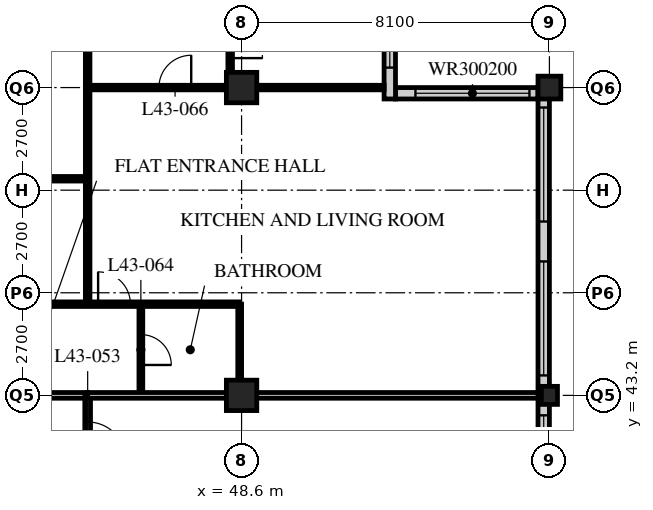
"""IFC4 building model, lengths in metres.
Left out: names, types, materials, properties, quantities, classifications, styles, units other than length and angle.
Written with IfcOpenShell. Run it as: python <this file> out.ifc"""

import sys

from ifc_helpers import new_model, si_unit, direction, frame, frame_2d, origin, origin_2d, place, context, subcontext, project, spatial, rectangle, hollow_rectangle, i_section, extrude, element, fill, save


model = new_model("IFC4")
c1 = context("Model", 3, precision=1e-05, world=origin(), true_north=direction((0.0, 1.0)))
c2 = subcontext(c1, "Body", "Model", "MODEL_VIEW")
j1 = project(units=[si_unit("LENGTHUNIT", "METRE"), si_unit("PLANEANGLEUNIT", "RADIAN")], contexts=[c1])
p1 = place(None, origin())
s1 = spatial("IfcSite", under=j1, at=p1, CompositionType="ELEMENT")
p2 = place(p1, origin())
s2 = spatial("IfcBuilding", under=s1, at=p2, CompositionType="ELEMENT")
p3 = place(p2, frame((0.0, 0.0, 170.4)))
s3 = spatial("IfcBuildingStorey", under=s2, at=p3, CompositionType="ELEMENT", Elevation=170.4)
for number, where, z_axis, x_axis in (
    (1, (48.6, 43.2, 0.0), (0.0, 0.0, 1.0), (1.0, 0.0, 0.0)),
    (2, (48.6, 51.3, 0.0), (0.0, 0.0, 1.0), (1.0, 0.0, 0.0)),
):
    element("IfcColumn", number, at=place(p3, frame(where, z_axis=z_axis, x_axis=x_axis)), inside=s3, PredefinedType="COLUMN", context=c2, shape_type="SweptSolid", body=[
        extrude(hollow_rectangle(XDim=0.8, YDim=0.8, WallThickness=0.08, at=origin_2d()), origin(), (0.0, 0.0, 1.0), 3.6),
    ])
p4 = place(p3, frame((56.7, 43.2, 0.0), z_axis=(0.0, 0.0, 1.0), x_axis=(1.0, 0.0, 0.0)))
e3 = element("IfcColumn", 3, at=p4, inside=s3, PredefinedType="COLUMN", context=c2, shape_type="SweptSolid", body=[
    extrude(i_section(OverallWidth=0.424, OverallDepth=0.475, WebThickness=0.048, FlangeThickness=0.077, FilletRadius=0.015, at=origin_2d()), origin(), (0.0, 0.0, 1.0), 3.6),
])
p5 = place(p3, frame((56.7, 51.3, 0.0), z_axis=(0.0, 0.0, 1.0), x_axis=(1.0, 0.0, 0.0)))
e4 = element("IfcColumn", 4, at=p5, inside=s3, PredefinedType="COLUMN", context=c2, shape_type="SweptSolid", body=[
    extrude(hollow_rectangle(XDim=0.6, YDim=0.6, WallThickness=0.05, at=origin_2d()), origin(), (0.0, 0.0, 1.0), 3.6),
])
p6 = place(p3, frame((56.55, 19.2, 0.0), z_axis=(0.0, 0.0, 1.0), x_axis=(0.0, 1.0, 0.0)))
e5 = element("IfcWall", 5, at=p6, inside=s3, PredefinedType="SOLIDWALL", context=c2, shape_type="SweptSolid", body=[
    extrude(rectangle(XDim=32.1, YDim=0.3, at=frame_2d((16.05, 0.0))), origin(), (0.0, 0.0, 1.0), 3.39),
])
p7 = place(p6, frame((0.225, 0.0, 0.6)))
e6 = element("IfcOpeningElement", 6, at=p7, cuts=e5, PredefinedType="OPENING", context=c2, shape_type="SweptSolid", body=[
    extrude(rectangle(XDim=3.0, YDim=2.4, at=frame_2d((1.5, 1.2))), frame((0.0, 0.16, 0.0), z_axis=(0.0, -1.0, 0.0), x_axis=(1.0, 0.0, 0.0)), (0.0, 0.0, 1.0), 0.32),
])
p8 = place(p6, frame((4.275, 0.0, 0.6)))
e7 = element("IfcOpeningElement", 7, at=p8, cuts=e5, PredefinedType="OPENING", context=c2, shape_type="SweptSolid", body=[
    extrude(rectangle(XDim=3.0, YDim=2.4, at=frame_2d((1.5, 1.2))), frame((0.0, 0.16, 0.0), z_axis=(0.0, -1.0, 0.0), x_axis=(1.0, 0.0, 0.0)), (0.0, 0.0, 1.0), 0.32),
])
p9 = place(p6, frame((8.325, 0.0, 0.6)))
e8 = element("IfcOpeningElement", 8, at=p9, cuts=e5, PredefinedType="OPENING", context=c2, shape_type="SweptSolid", body=[
    extrude(rectangle(XDim=3.0, YDim=2.4, at=frame_2d((1.5, 1.2))), frame((0.0, 0.16, 0.0), z_axis=(0.0, -1.0, 0.0), x_axis=(1.0, 0.0, 0.0)), (0.0, 0.0, 1.0), 0.32),
])
p10 = place(p6, frame((12.375, 0.0, 0.6)))
e9 = element("IfcOpeningElement", 9, at=p10, cuts=e5, PredefinedType="OPENING", context=c2, shape_type="SweptSolid", body=[
    extrude(rectangle(XDim=3.0, YDim=2.4, at=frame_2d((1.5, 1.2))), frame((0.0, 0.16, 0.0), z_axis=(0.0, -1.0, 0.0), x_axis=(1.0, 0.0, 0.0)), (0.0, 0.0, 1.0), 0.32),
])
p11 = place(p6, frame((16.425, 0.0, 0.6)))
e10 = element("IfcOpeningElement", 10, at=p11, cuts=e5, PredefinedType="OPENING", context=c2, shape_type="SweptSolid", body=[
    extrude(rectangle(XDim=3.0, YDim=2.4, at=frame_2d((1.5, 1.2))), frame((0.0, 0.16, 0.0), z_axis=(0.0, -1.0, 0.0), x_axis=(1.0, 0.0, 0.0)), (0.0, 0.0, 1.0), 0.32),
])
p12 = place(p6, frame((20.475, 0.0, 0.6)))
e11 = element("IfcOpeningElement", 11, at=p12, cuts=e5, PredefinedType="OPENING", context=c2, shape_type="SweptSolid", body=[
    extrude(rectangle(XDim=3.0, YDim=2.4, at=frame_2d((1.5, 1.2))), frame((0.0, 0.16, 0.0), z_axis=(0.0, -1.0, 0.0), x_axis=(1.0, 0.0, 0.0)), (0.0, 0.0, 1.0), 0.32),
])
p13 = place(p6, frame((24.525, 0.0, 0.6)))
e12 = element("IfcOpeningElement", 12, at=p13, cuts=e5, PredefinedType="OPENING", context=c2, shape_type="SweptSolid", body=[
    extrude(rectangle(XDim=3.0, YDim=2.4, at=frame_2d((1.5, 1.2))), frame((0.0, 0.16, 0.0), z_axis=(0.0, -1.0, 0.0), x_axis=(1.0, 0.0, 0.0)), (0.0, 0.0, 1.0), 0.32),
])
p14 = place(p6, frame((28.575, 0.0, 0.6)))
e13 = element("IfcOpeningElement", 13, at=p14, cuts=e5, PredefinedType="OPENING", context=c2, shape_type="SweptSolid", body=[
    extrude(rectangle(XDim=3.0, YDim=2.4, at=frame_2d((1.5, 1.2))), frame((0.0, 0.16, 0.0), z_axis=(0.0, -1.0, 0.0), x_axis=(1.0, 0.0, 0.0)), (0.0, 0.0, 1.0), 0.32),
])
p15 = place(p3, frame((56.4, 51.15, 0.0), z_axis=(0.0, 0.0, 1.0), x_axis=(-1.0, 0.0, 0.0)))
e14 = element("IfcWall", 14, at=p15, inside=s3, PredefinedType="SOLIDWALL", context=c2, shape_type="SweptSolid", body=[
    extrude(rectangle(XDim=3.75, YDim=0.3, at=frame_2d((1.875, 0.0))), origin(), (0.0, 0.0, 1.0), 3.39),
])
p16 = place(p15, frame((0.225, 0.0, 0.6)))
e15 = element("IfcOpeningElement", 15, at=p16, cuts=e14, PredefinedType="OPENING", context=c2, shape_type="SweptSolid", body=[
    extrude(rectangle(XDim=3.0, YDim=2.0, at=frame_2d((1.5, 1.0))), frame((0.0, 0.16, 0.0), z_axis=(0.0, -1.0, 0.0), x_axis=(1.0, 0.0, 0.0)), (0.0, 0.0, 1.0), 0.32),
])
p17 = place(p3, frame((52.5, 51.0, 0.0), z_axis=(0.0, 0.0, 1.0), x_axis=(0.0, 1.0, 0.0)))
e16 = element("IfcWall", 16, at=p17, inside=s3, PredefinedType="SOLIDWALL", context=c2, shape_type="SweptSolid", body=[
    extrude(rectangle(XDim=4.35, YDim=0.3, at=frame_2d((2.175, 0.0))), origin(), (0.0, 0.0, 1.0), 3.39),
])
p18 = place(p17, frame((0.825, 0.0, 0.6)))
e17 = element("IfcOpeningElement", 17, at=p18, cuts=e16, PredefinedType="OPENING", context=c2, shape_type="SweptSolid", body=[
    extrude(rectangle(XDim=3.0, YDim=2.0, at=frame_2d((1.5, 1.0))), frame((0.0, 0.16, 0.0), z_axis=(0.0, -1.0, 0.0), x_axis=(1.0, 0.0, 0.0)), (0.0, 0.0, 1.0), 0.32),
])
p19 = place(p3, frame((12.15, 43.2, 0.0), z_axis=(0.0, 0.0, 1.0), x_axis=(1.0, 0.0, 0.0)))
e18 = element("IfcWall", 18, at=p19, inside=s3, PredefinedType="PARTITIONING", context=c2, shape_type="SweptSolid", body=[
    extrude(rectangle(XDim=32.4, YDim=0.15, at=frame_2d((16.2, 0.0))), origin(), (0.0, 0.0, 1.0), 2.778),
])
p20 = place(p19, frame((4.95, 0.0, 0.0)))
e19 = element("IfcOpeningElement", 19, at=p20, cuts=e18, PredefinedType="OPENING", context=c2, shape_type="SweptSolid", body=[
    extrude(rectangle(XDim=1.0, YDim=2.1, at=frame_2d((0.5, 1.05))), frame((0.0, 0.085, 0.0), z_axis=(0.0, -1.0, 0.0), x_axis=(1.0, 0.0, 0.0)), (0.0, 0.0, 1.0), 0.17),
])
p21 = place(p19, frame((13.05, 0.0, 0.0)))
e20 = element("IfcOpeningElement", 20, at=p21, cuts=e18, PredefinedType="OPENING", context=c2, shape_type="SweptSolid", body=[
    extrude(rectangle(XDim=1.0, YDim=2.1, at=frame_2d((0.5, 1.05))), frame((0.0, 0.085, 0.0), z_axis=(0.0, -1.0, 0.0), x_axis=(1.0, 0.0, 0.0)), (0.0, 0.0, 1.0), 0.17),
])
p22 = place(p19, frame((21.15, 0.0, 0.0)))
e21 = element("IfcOpeningElement", 21, at=p22, cuts=e18, PredefinedType="OPENING", context=c2, shape_type="SweptSolid", body=[
    extrude(rectangle(XDim=1.0, YDim=2.1, at=frame_2d((0.5, 1.05))), frame((0.0, 0.085, 0.0), z_axis=(0.0, -1.0, 0.0), x_axis=(1.0, 0.0, 0.0)), (0.0, 0.0, 1.0), 0.17),
])
p23 = place(p19, frame((29.875, 0.0, 0.0)))
e22 = element("IfcOpeningElement", 22, at=p23, cuts=e18, PredefinedType="OPENING", context=c2, shape_type="SweptSolid", body=[
    extrude(rectangle(XDim=1.0, YDim=2.1, at=frame_2d((0.5, 1.05))), frame((0.0, 0.085, 0.0), z_axis=(0.0, -1.0, 0.0), x_axis=(1.0, 0.0, 0.0)), (0.0, 0.0, 1.0), 0.17),
])
p24 = place(p19, frame((1.525, 0.0, 0.0)))
e23 = element("IfcOpeningElement", 23, at=p24, cuts=e18, PredefinedType="OPENING", context=c2, shape_type="SweptSolid", body=[
    extrude(rectangle(XDim=1.0, YDim=2.1, at=frame_2d((0.5, 1.05))), frame((0.0, 0.085, 0.0), z_axis=(0.0, -1.0, 0.0), x_axis=(1.0, 0.0, 0.0)), (0.0, 0.0, 1.0), 0.17),
])
p25 = place(p3, frame((44.55, 18.9, 0.0), z_axis=(0.0, 0.0, 1.0), x_axis=(0.0, 1.0, 0.0)))
e24 = element("IfcWall", 24, at=p25, inside=s3, PredefinedType="PARTITIONING", context=c2, shape_type="SweptSolid", body=[
    extrude(rectangle(XDim=24.3, YDim=0.15, at=frame_2d((12.15, 0.0))), origin(), (0.0, 0.0, 1.0), 3.39),
])
p26 = place(p25, frame((2.35, 0.0, 0.0)))
e25 = element("IfcOpeningElement", 25, at=p26, cuts=e24, PredefinedType="OPENING", context=c2, shape_type="SweptSolid", body=[
    extrude(rectangle(XDim=1.0, YDim=2.1, at=frame_2d((0.5, 1.05))), frame((0.0, 0.085, 0.0), z_axis=(0.0, -1.0, 0.0), x_axis=(1.0, 0.0, 0.0)), (0.0, 0.0, 1.0), 0.17),
])
p27 = place(p25, frame((4.45, 0.0, 0.0)))
e26 = element("IfcOpeningElement", 26, at=p27, cuts=e24, PredefinedType="OPENING", context=c2, shape_type="SweptSolid", body=[
    extrude(rectangle(XDim=1.0, YDim=2.1, at=frame_2d((0.5, 1.05))), frame((0.0, 0.085, 0.0), z_axis=(0.0, -1.0, 0.0), x_axis=(1.0, 0.0, 0.0)), (0.0, 0.0, 1.0), 0.17),
])
p28 = place(p25, frame((18.55, 0.0, 0.0)))
e27 = element("IfcOpeningElement", 27, at=p28, cuts=e24, PredefinedType="OPENING", context=c2, shape_type="SweptSolid", body=[
    extrude(rectangle(XDim=1.0, YDim=2.1, at=frame_2d((0.5, 1.05))), frame((0.0, 0.085, 0.0), z_axis=(0.0, -1.0, 0.0), x_axis=(1.0, 0.0, 0.0)), (0.0, 0.0, 1.0), 0.17),
])
p29 = place(p25, frame((22.6, 0.0, 0.0)))
e28 = element("IfcOpeningElement", 28, at=p29, cuts=e24, PredefinedType="OPENING", context=c2, shape_type="SweptSolid", body=[
    extrude(rectangle(XDim=1.0, YDim=2.1, at=frame_2d((0.5, 1.05))), frame((0.0, 0.085, 0.0), z_axis=(0.0, -1.0, 0.0), x_axis=(1.0, 0.0, 0.0)), (0.0, 0.0, 1.0), 0.17),
])
p30 = place(p3, frame((45.95, 43.2, 0.0), z_axis=(0.0, 0.0, 1.0), x_axis=(0.0, 1.0, 0.0)))
e29 = element("IfcWall", 29, at=p30, inside=s3, PredefinedType="PARTITIONING", context=c2, shape_type="SweptSolid", body=[
    extrude(rectangle(XDim=2.4, YDim=0.1, at=frame_2d((1.2, 0.0))), origin(), (0.0, 0.0, 1.0), 3.39),
])
p31 = place(p30, frame((0.8, 0.0, 0.0)))
e30 = element("IfcOpeningElement", 30, at=p31, cuts=e29, PredefinedType="OPENING", context=c2, shape_type="SweptSolid", body=[
    extrude(rectangle(XDim=0.8, YDim=2.1, at=frame_2d((0.4, 1.05))), frame((0.0, 0.06, 0.0), z_axis=(0.0, -1.0, 0.0), x_axis=(1.0, 0.0, 0.0)), (0.0, 0.0, 1.0), 0.12),
])
p32 = place(p3, frame((48.55, 43.2, 0.0), z_axis=(0.0, 0.0, 1.0), x_axis=(0.0, 1.0, 0.0)))
e31 = element("IfcWall", 31, at=p32, inside=s3, PredefinedType="PARTITIONING", context=c2, shape_type="SweptSolid", body=[
    extrude(rectangle(XDim=2.4, YDim=0.1, at=frame_2d((1.2, 0.0))), origin(), (0.0, 0.0, 1.0), 2.778),
])
p33 = place(p3, frame((44.55, 45.6, 0.0), z_axis=(0.0, 0.0, 1.0), x_axis=(0.0, 1.0, 0.0)))
e32 = element("IfcWall", 32, at=p33, inside=s3, PredefinedType="PARTITIONING", context=c2, shape_type="SweptSolid", body=[
    extrude(rectangle(XDim=13.5, YDim=0.12, at=frame_2d((6.75, 0.0))), origin(), (0.0, 0.0, 1.0), 3.39),
])
p34 = place(p3, frame((44.55, 51.3, 0.0), z_axis=(0.0, 0.0, 1.0), x_axis=(1.0, 0.0, 0.0)))
e33 = element("IfcWall", 33, at=p34, inside=s3, PredefinedType="PARTITIONING", context=c2, shape_type="SweptSolid", body=[
    extrude(rectangle(XDim=7.8, YDim=0.12, at=frame_2d((3.9, 0.0))), origin(), (0.0, 0.0, 1.0), 2.778),
])
p35 = place(p34, frame((1.875, 0.0, 0.0)))
e34 = element("IfcOpeningElement", 34, at=p35, cuts=e33, PredefinedType="OPENING", context=c2, shape_type="SweptSolid", body=[
    extrude(rectangle(XDim=0.85, YDim=2.1, at=frame_2d((0.425, 1.05))), frame((0.0, 0.07, 0.0), z_axis=(0.0, -1.0, 0.0), x_axis=(1.0, 0.0, 0.0)), (0.0, 0.0, 1.0), 0.14),
])
p36 = place(p3, frame((44.55, 43.2, 0.0), z_axis=(0.0, 0.0, 1.0), x_axis=(1.0, 0.0, 0.0)))
e35 = element("IfcWall", 35, at=p36, inside=s3, PredefinedType="PARTITIONING", context=c2, shape_type="SweptSolid", body=[
    extrude(rectangle(XDim=11.85, YDim=0.15, at=frame_2d((5.925, 0.0))), origin(), (0.0, 0.0, 1.0), 2.778),
])
p37 = place(p3, frame((8.15, 45.6, 0.0), z_axis=(0.0, 0.0, 1.0), x_axis=(1.0, 0.0, 0.0)))
e36 = element("IfcWall", 36, at=p37, inside=s3, PredefinedType="PARTITIONING", context=c2, shape_type="SweptSolid", body=[
    extrude(rectangle(XDim=40.4, YDim=0.12, at=frame_2d((20.2, 0.0))), origin(), (0.0, 0.0, 1.0), 3.39),
])
p38 = place(p37, frame((9.025, 0.0, 0.0)))
e37 = element("IfcOpeningElement", 37, at=p38, cuts=e36, PredefinedType="OPENING", context=c2, shape_type="SweptSolid", body=[
    extrude(rectangle(XDim=0.85, YDim=2.1, at=frame_2d((0.425, 1.05))), frame((0.0, 0.07, 0.0), z_axis=(0.0, -1.0, 0.0), x_axis=(1.0, 0.0, 0.0)), (0.0, 0.0, 1.0), 0.14),
])
p39 = place(p37, frame((12.425, 0.0, 0.0)))
e38 = element("IfcOpeningElement", 38, at=p39, cuts=e36, PredefinedType="OPENING", context=c2, shape_type="SweptSolid", body=[
    extrude(rectangle(XDim=0.85, YDim=2.1, at=frame_2d((0.425, 1.05))), frame((0.0, 0.07, 0.0), z_axis=(0.0, -1.0, 0.0), x_axis=(1.0, 0.0, 0.0)), (0.0, 0.0, 1.0), 0.14),
])
p40 = place(p37, frame((17.125, 0.0, 0.0)))
e39 = element("IfcOpeningElement", 39, at=p40, cuts=e36, PredefinedType="OPENING", context=c2, shape_type="SweptSolid", body=[
    extrude(rectangle(XDim=0.85, YDim=2.1, at=frame_2d((0.425, 1.05))), frame((0.0, 0.07, 0.0), z_axis=(0.0, -1.0, 0.0), x_axis=(1.0, 0.0, 0.0)), (0.0, 0.0, 1.0), 0.14),
])
p41 = place(p37, frame((20.525, 0.0, 0.0)))
e40 = element("IfcOpeningElement", 40, at=p41, cuts=e36, PredefinedType="OPENING", context=c2, shape_type="SweptSolid", body=[
    extrude(rectangle(XDim=0.85, YDim=2.1, at=frame_2d((0.425, 1.05))), frame((0.0, 0.07, 0.0), z_axis=(0.0, -1.0, 0.0), x_axis=(1.0, 0.0, 0.0)), (0.0, 0.0, 1.0), 0.14),
])
p42 = place(p37, frame((25.225, 0.0, 0.0)))
e41 = element("IfcOpeningElement", 41, at=p42, cuts=e36, PredefinedType="OPENING", context=c2, shape_type="SweptSolid", body=[
    extrude(rectangle(XDim=0.85, YDim=2.1, at=frame_2d((0.425, 1.05))), frame((0.0, 0.07, 0.0), z_axis=(0.0, -1.0, 0.0), x_axis=(1.0, 0.0, 0.0)), (0.0, 0.0, 1.0), 0.14),
])
p43 = place(p37, frame((28.625, 0.0, 0.0)))
e42 = element("IfcOpeningElement", 42, at=p43, cuts=e36, PredefinedType="OPENING", context=c2, shape_type="SweptSolid", body=[
    extrude(rectangle(XDim=0.85, YDim=2.1, at=frame_2d((0.425, 1.05))), frame((0.0, 0.07, 0.0), z_axis=(0.0, -1.0, 0.0), x_axis=(1.0, 0.0, 0.0)), (0.0, 0.0, 1.0), 0.14),
])
p44 = place(p37, frame((32.825, 0.0, 0.0)))
e43 = element("IfcOpeningElement", 43, at=p44, cuts=e36, PredefinedType="OPENING", context=c2, shape_type="SweptSolid", body=[
    extrude(rectangle(XDim=0.85, YDim=2.1, at=frame_2d((0.425, 1.05))), frame((0.0, 0.07, 0.0), z_axis=(0.0, -1.0, 0.0), x_axis=(1.0, 0.0, 0.0)), (0.0, 0.0, 1.0), 0.14),
])
p45 = place(p37, frame((36.675, 0.0, 0.0)))
e44 = element("IfcOpeningElement", 44, at=p45, cuts=e36, PredefinedType="OPENING", context=c2, shape_type="SweptSolid", body=[
    extrude(rectangle(XDim=0.85, YDim=2.1, at=frame_2d((0.425, 1.05))), frame((0.0, 0.07, 0.0), z_axis=(0.0, -1.0, 0.0), x_axis=(1.0, 0.0, 0.0)), (0.0, 0.0, 1.0), 0.14),
])
p46 = place(p37, frame((6.725, 0.0, 0.0)))
e45 = element("IfcOpeningElement", 45, at=p46, cuts=e36, PredefinedType="OPENING", context=c2, shape_type="SweptSolid", body=[
    extrude(rectangle(XDim=0.85, YDim=2.1, at=frame_2d((0.425, 1.05))), frame((0.0, 0.07, 0.0), z_axis=(0.0, -1.0, 0.0), x_axis=(1.0, 0.0, 0.0)), (0.0, 0.0, 1.0), 0.14),
])
p47 = place(p37, frame((2.875, 0.0, 0.0)))
e46 = element("IfcOpeningElement", 46, at=p47, cuts=e36, PredefinedType="OPENING", context=c2, shape_type="SweptSolid", body=[
    extrude(rectangle(XDim=0.85, YDim=2.1, at=frame_2d((0.425, 1.05))), frame((0.0, 0.07, 0.0), z_axis=(0.0, -1.0, 0.0), x_axis=(1.0, 0.0, 0.0)), (0.0, 0.0, 1.0), 0.14),
])
p48 = place(p3, frame((48.3, 51.3, 0.0), z_axis=(0.0, 0.0, 1.0), x_axis=(0.0, 1.0, 0.0)))
e47 = element("IfcWall", 47, at=p48, inside=s3, PredefinedType="PARTITIONING", context=c2, shape_type="SweptSolid", body=[
    extrude(rectangle(XDim=3.75, YDim=0.12, at=frame_2d((1.875, 0.0))), origin(), (0.0, 0.0, 1.0), 3.39),
])
p49 = place(p48, frame((0.775, 0.0, 0.0)))
e48 = element("IfcOpeningElement", 48, at=p49, cuts=e47, PredefinedType="OPENING", context=c2, shape_type="SweptSolid", body=[
    extrude(rectangle(XDim=0.85, YDim=2.1, at=frame_2d((0.425, 1.05))), frame((0.0, 0.07, 0.0), z_axis=(0.0, -1.0, 0.0), x_axis=(1.0, 0.0, 0.0)), (0.0, 0.0, 1.0), 0.14),
])
p50 = place(p3, frame((36.45, 48.9, 0.0), z_axis=(0.0, 0.0, 1.0), x_axis=(1.0, 0.0, 0.0)))
e49 = element("IfcWall", 49, at=p50, inside=s3, PredefinedType="PARTITIONING", context=c2, shape_type="SweptSolid", body=[
    extrude(rectangle(XDim=8.1, YDim=0.12, at=frame_2d((4.05, 0.0))), origin(), (0.0, 0.0, 1.0), 3.39),
])
p51 = place(p50, frame((1.6, 0.0, 0.0)))
e50 = element("IfcOpeningElement", 50, at=p51, cuts=e49, PredefinedType="OPENING", context=c2, shape_type="SweptSolid", body=[
    extrude(rectangle(XDim=0.85, YDim=2.1, at=frame_2d((0.425, 1.05))), frame((0.0, 0.07, 0.0), z_axis=(0.0, -1.0, 0.0), x_axis=(1.0, 0.0, 0.0)), (0.0, 0.0, 1.0), 0.14),
])
p52 = place(p50, frame((5.65, 0.0, 0.0)))
e51 = element("IfcOpeningElement", 51, at=p52, cuts=e49, PredefinedType="OPENING", context=c2, shape_type="SweptSolid", body=[
    extrude(rectangle(XDim=0.85, YDim=2.1, at=frame_2d((0.425, 1.05))), frame((0.0, 0.07, 0.0), z_axis=(0.0, -1.0, 0.0), x_axis=(1.0, 0.0, 0.0)), (0.0, 0.0, 1.0), 0.14),
])
p53 = place(p12, origin())
e52 = element("IfcWindow", 52, at=p53, inside=s3, PartitioningType="SINGLE_PANEL", PredefinedType="WINDOW", context=c2, shape_type="SweptSolid", body=[
    extrude(rectangle(XDim=3.0, YDim=2.4, at=frame_2d((1.5, 1.2))), frame((0.0, 0.03, 0.0), z_axis=(0.0, -1.0, 0.0), x_axis=(1.0, 0.0, 0.0)), (0.0, 0.0, 1.0), 0.06),
])
fill(e11, e52)
p54 = place(p13, origin())
e53 = element("IfcWindow", 53, at=p54, inside=s3, PartitioningType="SINGLE_PANEL", PredefinedType="WINDOW", context=c2, shape_type="SweptSolid", body=[
    extrude(rectangle(XDim=3.0, YDim=2.4, at=frame_2d((1.5, 1.2))), frame((0.0, 0.03, 0.0), z_axis=(0.0, -1.0, 0.0), x_axis=(1.0, 0.0, 0.0)), (0.0, 0.0, 1.0), 0.06),
])
fill(e12, e53)
p55 = place(p14, origin())
e54 = element("IfcWindow", 54, at=p55, inside=s3, PartitioningType="SINGLE_PANEL", PredefinedType="WINDOW", context=c2, shape_type="SweptSolid", body=[
    extrude(rectangle(XDim=3.0, YDim=2.4, at=frame_2d((1.5, 1.2))), frame((0.0, 0.03, 0.0), z_axis=(0.0, -1.0, 0.0), x_axis=(1.0, 0.0, 0.0)), (0.0, 0.0, 1.0), 0.06),
])
fill(e13, e54)
p56 = place(p16, origin())
e55 = element("IfcWindow", 55, at=p56, inside=s3, PartitioningType="SINGLE_PANEL", PredefinedType="WINDOW", context=c2, shape_type="SweptSolid", body=[
    extrude(rectangle(XDim=3.0, YDim=2.0, at=frame_2d((1.5, 1.0))), frame((0.0, 0.03, 0.0), z_axis=(0.0, -1.0, 0.0), x_axis=(1.0, 0.0, 0.0)), (0.0, 0.0, 1.0), 0.06),
])
fill(e15, e55)
p57 = place(p18, origin())
e56 = element("IfcWindow", 56, at=p57, inside=s3, PartitioningType="SINGLE_PANEL", PredefinedType="WINDOW", context=c2, shape_type="SweptSolid", body=[
    extrude(rectangle(XDim=3.0, YDim=2.0, at=frame_2d((1.5, 1.0))), frame((0.0, 0.03, 0.0), z_axis=(0.0, -1.0, 0.0), x_axis=(1.0, 0.0, 0.0)), (0.0, 0.0, 1.0), 0.06),
])
fill(e17, e56)
p58 = place(p29, origin())
e57 = element("IfcDoor", 57, at=p58, inside=s3, OperationType="SINGLE_SWING_RIGHT", PredefinedType="DOOR", context=c2, shape_type="SweptSolid", body=[
    extrude(rectangle(XDim=1.0, YDim=2.1, at=frame_2d((0.5, 1.05))), frame((0.0, 0.025, 0.0), z_axis=(0.0, -1.0, 0.0), x_axis=(1.0, 0.0, 0.0)), (0.0, 0.0, 1.0), 0.05),
])
fill(e28, e57)
p59 = place(p31, origin())
e58 = element("IfcDoor", 58, at=p59, inside=s3, OperationType="SINGLE_SWING_RIGHT", PredefinedType="DOOR", context=c2, shape_type="SweptSolid", body=[
    extrude(rectangle(XDim=0.8, YDim=2.1, at=frame_2d((0.4, 1.05))), frame((0.0, 0.025, 0.0), z_axis=(0.0, -1.0, 0.0), x_axis=(1.0, 0.0, 0.0)), (0.0, 0.0, 1.0), 0.05),
])
fill(e30, e58)
p60 = place(p45, origin())
e59 = element("IfcDoor", 59, at=p60, inside=s3, OperationType="SINGLE_SWING_LEFT", PredefinedType="DOOR", context=c2, shape_type="SweptSolid", body=[
    extrude(rectangle(XDim=0.85, YDim=2.1, at=frame_2d((0.425, 1.05))), frame((0.0, 0.025, 0.0), z_axis=(0.0, -1.0, 0.0), x_axis=(1.0, 0.0, 0.0)), (0.0, 0.0, 1.0), 0.05),
])
fill(e44, e59)
p61 = place(p35, origin())
e60 = element("IfcDoor", 60, at=p61, inside=s3, OperationType="SINGLE_SWING_RIGHT", PredefinedType="DOOR", context=c2, shape_type="SweptSolid", body=[
    extrude(rectangle(XDim=0.85, YDim=2.1, at=frame_2d((0.425, 1.05))), frame((0.0, 0.025, 0.0), z_axis=(0.0, -1.0, 0.0), x_axis=(1.0, 0.0, 0.0)), (0.0, 0.0, 1.0), 0.05),
])
fill(e34, e60)
p62 = place(p49, origin())
e61 = element("IfcDoor", 61, at=p62, inside=s3, OperationType="SINGLE_SWING_RIGHT", PredefinedType="DOOR", context=c2, shape_type="SweptSolid", body=[
    extrude(rectangle(XDim=0.85, YDim=2.1, at=frame_2d((0.425, 1.05))), frame((0.0, 0.025, 0.0), z_axis=(0.0, -1.0, 0.0), x_axis=(1.0, 0.0, 0.0)), (0.0, 0.0, 1.0), 0.05),
])
fill(e48, e61)
save(model, sys.argv[1])
